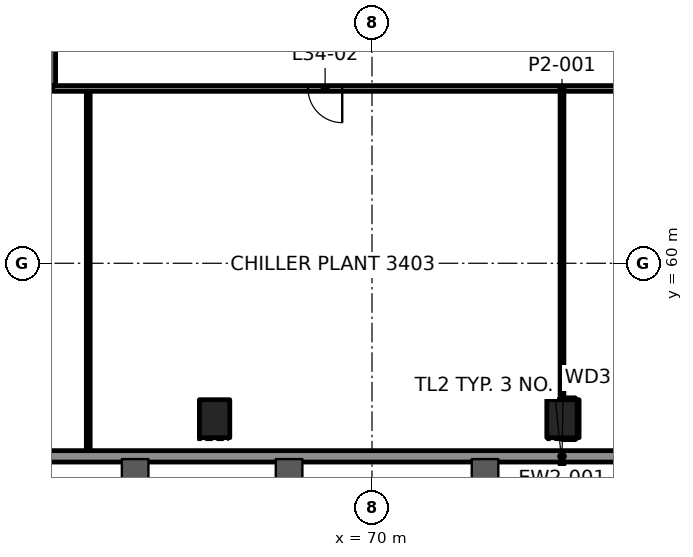
"""IFC4 building model, lengths in metres.
Left out: names, types, materials, properties, quantities, classifications, styles, units other than length and angle.
Written with IfcOpenShell. Run it as: python <this file> out.ifc"""

import sys

from ifc_helpers import new_model, si_unit, direction, frame, frame_2d, origin, origin_2d, place, context, subcontext, project, spatial, rectangle, hollow_rectangle, extrude, element, fill, save


model = new_model("IFC4")
c1 = context("Model", 3, precision=1e-05, world=origin(), true_north=direction((0.0, 1.0)))
c2 = subcontext(c1, "Body", "Model", "MODEL_VIEW")
j1 = project(units=[si_unit("LENGTHUNIT", "METRE"), si_unit("PLANEANGLEUNIT", "RADIAN")], contexts=[c1])
p1 = place(None, origin())
s1 = spatial("IfcSite", under=j1, at=p1, CompositionType="ELEMENT")
p2 = place(p1, origin())
s2 = spatial("IfcBuilding", under=s1, at=p2, CompositionType="ELEMENT")
p3 = place(p2, frame((0.0, 0.0, 151.3)))
s3 = spatial("IfcBuildingStorey", under=s2, at=p3, CompositionType="ELEMENT", Elevation=151.3)
for number, where, z_axis, x_axis in (
    (1, (65.858, 55.909, -0.0), (0.0, 0.0, 1.0), (1.0, 0.0, 0.0)),
    (2, (75.0, 55.909, -0.0), (0.0, 0.0, 1.0), (1.0, 0.0, 0.0)),
):
    element("IfcColumn", number, at=place(p3, frame(where, z_axis=z_axis, x_axis=x_axis)), inside=s3, PredefinedType="COLUMN", context=c2, shape_type="SweptSolid", body=[
        extrude(hollow_rectangle(XDim=0.8, YDim=1.0, WallThickness=0.05, at=origin_2d()), origin(), (0.0, 0.0, 1.0), 4.5),
    ])
p4 = place(p3, frame((75.0, 55.409, 0.0), z_axis=(0.0, 0.0, 1.0), x_axis=(1.0, 0.0, 0.0)))
e3 = element("IfcWall", 3, at=p4, inside=s3, PredefinedType="PARTITIONING", context=c2, shape_type="SweptSolid", body=[
    extrude(rectangle(XDim=0.35, YDim=0.1, at=frame_2d((0.175, 0.0))), origin(), (0.0, 0.0, 1.0), 3.7),
])
p5 = place(p3, frame((75.05, 56.409, 0.0), z_axis=(0.0, 0.0, 1.0), x_axis=(1.0, 0.0, 0.0)))
e4 = element("IfcWall", 4, at=p5, inside=s3, PredefinedType="PARTITIONING", context=c2, shape_type="SweptSolid", body=[
    extrude(rectangle(XDim=0.3, YDim=0.1, at=frame_2d((0.15, 0.0))), origin(), (0.0, 0.0, 1.0), 3.7),
])
p6 = place(p3, frame((88.399, 64.6, 0.0), z_axis=(0.0, 0.0, 1.0), x_axis=(-1.0, 0.0, 0.0)))
e5 = element("IfcWall", 5, at=p6, inside=s3, PredefinedType="PARTITIONING", context=c2, shape_type="SweptSolid", body=[
    extrude(rectangle(XDim=26.799, YDim=0.15, at=frame_2d((13.399, 0.0))), origin(), (0.0, 0.0, 1.0), 3.7),
])
p7 = place(p6, frame((6.201, 0.0, 0.0)))
e6 = element("IfcOpeningElement", 6, at=p7, cuts=e5, PredefinedType="OPENING", context=c2, shape_type="SweptSolid", body=[
    extrude(rectangle(XDim=1.2, YDim=2.1, at=frame_2d((0.6, 1.05))), frame((0.0, 0.085, 0.0), z_axis=(0.0, -1.0, 0.0), x_axis=(1.0, 0.0, 0.0)), (0.0, 0.0, 1.0), 0.17),
])
p8 = place(p6, frame((19.182, 0.0, 0.0)))
e7 = element("IfcOpeningElement", 7, at=p8, cuts=e5, PredefinedType="OPENING", context=c2, shape_type="SweptSolid", body=[
    extrude(rectangle(XDim=0.9, YDim=2.1, at=frame_2d((0.45, 1.05))), frame((0.0, 0.085, 0.0), z_axis=(0.0, -1.0, 0.0), x_axis=(1.0, 0.0, 0.0)), (0.0, 0.0, 1.0), 0.17),
])
p9 = place(p3, frame((61.6, 65.878, 0.0), z_axis=(0.0, 0.0, 1.0), x_axis=(-0.866021599452, -0.500006589238, 0.0)))
e8 = element("IfcWall", 8, at=p9, inside=s3, PredefinedType="PARTITIONING", context=c2, shape_type="SweptSolid", body=[
    extrude(rectangle(XDim=14.38, YDim=0.15, at=frame_2d((7.19, 0.0))), origin(), (0.0, 0.0, 1.0), 3.7),
])
p10 = place(p9, frame((8.2, 0.0, 0.0)))
e9 = element("IfcOpeningElement", 9, at=p10, cuts=e8, PredefinedType="OPENING", context=c2, shape_type="SweptSolid", body=[
    extrude(rectangle(XDim=0.9, YDim=2.1, at=frame_2d((0.45, 1.05))), frame((0.0, 0.085, 0.0), z_axis=(0.0, -1.0, 0.0), x_axis=(1.0, 0.0, 0.0)), (0.0, 0.0, 1.0), 0.17),
])
p11 = place(p3, frame((75.4, 55.41, 0.0), z_axis=(0.0, 0.0, 1.0), x_axis=(0.0, 1.0, 0.0)))
e10 = element("IfcWall", 10, at=p11, inside=s3, PredefinedType="PARTITIONING", context=c2, shape_type="SweptSolid", body=[
    extrude(rectangle(XDim=0.999, YDim=0.1, at=frame_2d((0.5, 0.0))), origin(), (0.0, 0.0, 1.0), 3.7),
])
p12 = place(p3, frame((75.0, 56.409, 0.0), z_axis=(0.0, 0.0, 1.0), x_axis=(0.0, 1.0, 0.0)))
e11 = element("IfcWall", 11, at=p12, inside=s3, PredefinedType="PARTITIONING", context=c2, shape_type="SweptSolid", body=[
    extrude(rectangle(XDim=8.116, YDim=0.1, at=frame_2d((4.058, 0.0))), origin(), (0.0, 0.0, 1.0), 3.7),
])
p13 = place(p3, frame((62.534, 54.949, 0.0), z_axis=(0.0, 0.0, 1.0), x_axis=(0.0, 1.0, 0.0)))
e12 = element("IfcWall", 12, at=p13, inside=s3, PredefinedType="PARTITIONING", context=c2, shape_type="SweptSolid", body=[
    extrude(rectangle(XDim=9.576, YDim=0.1, at=frame_2d((4.788, 0.0))), origin(), (0.0, 0.0, 1.0), 3.7),
])
p14 = place(p3, frame((61.6, 64.676, 0.0), z_axis=(0.0, 0.0, 1.0), x_axis=(0.0, 1.0, 0.0)))
e13 = element("IfcWall", 13, at=p14, inside=s3, PredefinedType="PARTITIONING", context=c2, shape_type="SweptSolid", body=[
    extrude(rectangle(XDim=1.066, YDim=0.15, at=frame_2d((0.533, 0.0))), origin(), (0.0, 0.0, 1.0), 3.7),
])
p15 = place(p3, frame((47.523, 54.919, 0.0), z_axis=(0.0, 0.0, 1.0), x_axis=(1.0, 0.0, 0.0)))
e14 = element("IfcWall", 14, at=p15, inside=s3, PredefinedType="SOLIDWALL", context=c2, shape_type="SweptSolid", body=[
    extrude(rectangle(XDim=54.954, YDim=0.3, at=frame_2d((27.477, 0.0))), origin(), (0.0, 0.0, 1.0), 4.3),
])
p16 = place(p15, frame((2.96, 0.0, 0.8)))
e15 = element("IfcOpeningElement", 15, at=p16, cuts=e14, PredefinedType="OPENING", context=c2, shape_type="SweptSolid", body=[
    extrude(rectangle(XDim=3.0, YDim=2.4, at=frame_2d((1.5, 1.2))), frame((0.0, 0.16, 0.0), z_axis=(0.0, -1.0, 0.0), x_axis=(1.0, 0.0, 0.0)), (0.0, 0.0, 1.0), 0.32),
])
p17 = place(p15, frame((48.994, 0.0, 0.8)))
e16 = element("IfcOpeningElement", 16, at=p17, cuts=e14, PredefinedType="OPENING", context=c2, shape_type="SweptSolid", body=[
    extrude(rectangle(XDim=3.0, YDim=2.4, at=frame_2d((1.5, 1.2))), frame((0.0, 0.16, 0.0), z_axis=(0.0, -1.0, 0.0), x_axis=(1.0, 0.0, 0.0)), (0.0, 0.0, 1.0), 0.32),
])
p18 = place(p3, frame((71.348, 108.836, 0.0), z_axis=(0.0, 0.0, 1.0), x_axis=(-0.500000750612, -0.866024970418, 0.0)))
e17 = element("IfcWall", 17, at=p18, inside=s3, PredefinedType="SOLIDWALL", context=c2, shape_type="SweptSolid", body=[
    extrude(rectangle(XDim=54.954, YDim=0.3, at=frame_2d((27.477, 0.0))), origin(), (0.0, 0.0, 1.0), 4.3),
])
p19 = place(p18, frame((2.96, 0.0, 0.8)))
e18 = element("IfcOpeningElement", 18, at=p19, cuts=e17, PredefinedType="OPENING", context=c2, shape_type="SweptSolid", body=[
    extrude(rectangle(XDim=3.0, YDim=2.4, at=frame_2d((1.5, 1.2))), frame((0.0, 0.16, 0.0), z_axis=(0.0, -1.0, 0.0), x_axis=(1.0, 0.0, 0.0)), (0.0, 0.0, 1.0), 0.32),
])
p20 = place(p18, frame((48.994, 0.0, 0.8)))
e19 = element("IfcOpeningElement", 19, at=p20, cuts=e17, PredefinedType="OPENING", context=c2, shape_type="SweptSolid", body=[
    extrude(rectangle(XDim=3.0, YDim=2.4, at=frame_2d((1.5, 1.2))), frame((0.0, 0.16, 0.0), z_axis=(0.0, -1.0, 0.0), x_axis=(1.0, 0.0, 0.0)), (0.0, 0.0, 1.0), 0.32),
])
p21 = place(p8, origin())
e20 = element("IfcDoor", 20, at=p21, inside=s3, OperationType="SINGLE_SWING_LEFT", PredefinedType="DOOR", context=c2, shape_type="SweptSolid", body=[
    extrude(rectangle(XDim=0.9, YDim=2.1, at=frame_2d((0.45, 1.05))), frame((0.0, 0.025, 0.0), z_axis=(0.0, -1.0, 0.0), x_axis=(1.0, 0.0, 0.0)), (0.0, 0.0, 1.0), 0.05),
])
fill(e7, e20)
save(model, sys.argv[1])
